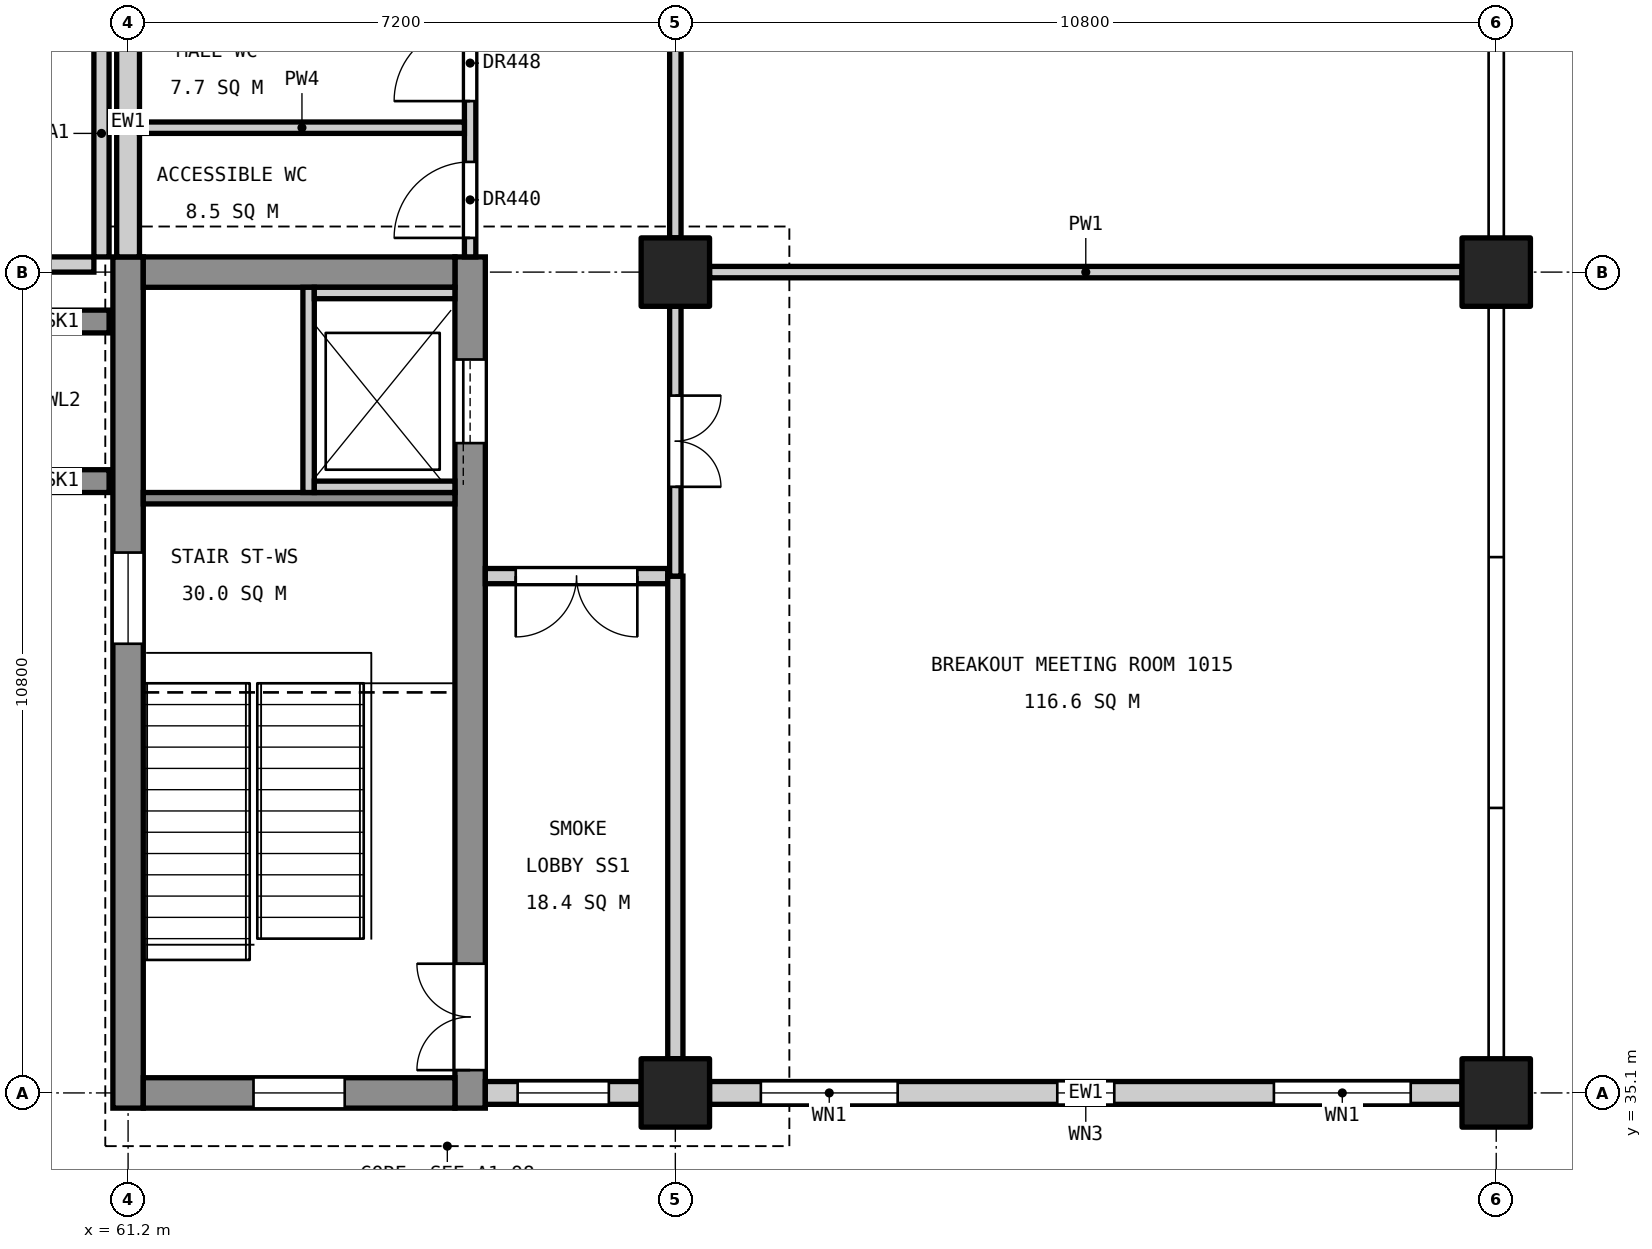
"""IFC4 building model, lengths in metres.
Left out: names, types, materials, properties, quantities, classifications, styles, units other than length and angle.
Written with IfcOpenShell. Run it as: python <this file> out.ifc"""

import sys

from ifc_helpers import new_model, si_unit, direction, frame, frame_2d, origin, origin_2d, place, context, subcontext, project, spatial, rectangle, extrude, element, fill, save


model = new_model("IFC4")
c1 = context("Model", 3, precision=1e-05, world=origin(), true_north=direction((0.0, 1.0)))
c2 = subcontext(c1, "Body", "Model", "MODEL_VIEW")
j1 = project(units=[si_unit("LENGTHUNIT", "METRE"), si_unit("PLANEANGLEUNIT", "RADIAN")], contexts=[c1])
p1 = place(None, origin())
s1 = spatial("IfcSite", under=j1, at=p1, CompositionType="ELEMENT")
p2 = place(p1, origin())
s2 = spatial("IfcBuilding", under=s1, at=p2, CompositionType="ELEMENT")
p3 = place(p2, frame((0.0, 0.0, 51.0)))
s3 = spatial("IfcBuildingStorey", under=s2, at=p3, CompositionType="ELEMENT", Elevation=51.0)
for number, where, z_axis, x_axis in (
    (1, (68.4, 35.1, 0.0), (0.0, 0.0, 1.0), (1.0, 0.0, 0.0)),
    (2, (68.4, 45.9, 0.0), (0.0, 0.0, 1.0), (1.0, 0.0, 0.0)),
    (3, (79.2, 35.1, 0.0), (0.0, 0.0, 1.0), (1.0, 0.0, 0.0)),
    (4, (79.2, 45.9, 0.0), (0.0, 0.0, 1.0), (1.0, 0.0, 0.0)),
):
    element("IfcColumn", number, at=place(p3, frame(where, z_axis=z_axis, x_axis=x_axis)), inside=s3, PredefinedType="COLUMN", context=c2, shape_type="SweptSolid", body=[
        extrude(rectangle(XDim=0.9, YDim=0.9, at=origin_2d()), origin(), (0.0, 0.0, 1.0), 4.8),
    ])
p4 = place(p3, frame((61.2, 34.9, 0.0), z_axis=(0.0, 0.0, 1.0), x_axis=(0.0, 1.0, 0.0)))
e5 = element("IfcWall", 5, at=p4, inside=s3, PredefinedType="SHEAR", context=c2, shape_type="SweptSolid", body=[
    extrude(rectangle(XDim=11.2, YDim=0.4, at=frame_2d((5.6, 0.0))), origin(), (0.0, 0.0, 1.0), 4.55),
])
p5 = place(p4, frame((6.11, 0.0, 3.4)))
e6 = element("IfcOpeningElement", 6, at=p5, cuts=e5, PredefinedType="OPENING", context=c2, shape_type="SweptSolid", body=[
    extrude(rectangle(XDim=1.2, YDim=0.9, at=frame_2d((0.6, 0.45))), frame((0.0, 0.21, 0.0), z_axis=(0.0, -1.0, 0.0), x_axis=(1.0, 0.0, 0.0)), (0.0, 0.0, 1.0), 0.42),
])
p6 = place(p3, frame((65.7, 34.9, 0.0), z_axis=(0.0, 0.0, 1.0), x_axis=(0.0, 1.0, 0.0)))
e7 = element("IfcWall", 7, at=p6, inside=s3, PredefinedType="SHEAR", context=c2, shape_type="SweptSolid", body=[
    extrude(rectangle(XDim=11.2, YDim=0.4, at=frame_2d((5.6, 0.0))), origin(), (0.0, 0.0, 1.0), 4.55),
])
p7 = place(p6, frame((0.5, 0.0, 0.0)))
e8 = element("IfcOpeningElement", 8, at=p7, cuts=e7, PredefinedType="OPENING", context=c2, shape_type="SweptSolid", body=[
    extrude(rectangle(XDim=1.4, YDim=2.1, at=frame_2d((0.7, 1.05))), frame((0.0, 0.21, 0.0), z_axis=(0.0, -1.0, 0.0), x_axis=(1.0, 0.0, 0.0)), (0.0, 0.0, 1.0), 0.42),
])
p8 = place(p6, frame((8.75, 0.0, 0.0)))
e9 = element("IfcOpeningElement", 9, at=p8, cuts=e7, PredefinedType="OPENING", context=c2, shape_type="SweptSolid", body=[
    extrude(rectangle(XDim=1.1, YDim=2.1, at=frame_2d((0.55, 1.05))), frame((0.0, 0.21, 0.0), z_axis=(0.0, -1.0, 0.0), x_axis=(1.0, 0.0, 0.0)), (0.0, 0.0, 1.0), 0.42),
])
p9 = place(p3, frame((61.4, 35.1, 0.0), z_axis=(0.0, 0.0, 1.0), x_axis=(1.0, 0.0, 0.0)))
e10 = element("IfcWall", 10, at=p9, inside=s3, PredefinedType="SHEAR", context=c2, shape_type="SweptSolid", body=[
    extrude(rectangle(XDim=4.1, YDim=0.4, at=frame_2d((2.05, 0.0))), origin(), (0.0, 0.0, 1.0), 4.55),
])
p10 = place(p9, frame((1.45, 0.0, 3.4)))
e11 = element("IfcOpeningElement", 11, at=p10, cuts=e10, PredefinedType="OPENING", context=c2, shape_type="SweptSolid", body=[
    extrude(rectangle(XDim=1.2, YDim=0.9, at=frame_2d((0.6, 0.45))), frame((0.0, 0.21, 0.0), z_axis=(0.0, -1.0, 0.0), x_axis=(1.0, 0.0, 0.0)), (0.0, 0.0, 1.0), 0.42),
])
p11 = place(p3, frame((61.4, 45.9, 0.0), z_axis=(0.0, 0.0, 1.0), x_axis=(1.0, 0.0, 0.0)))
e12 = element("IfcWall", 12, at=p11, inside=s3, PredefinedType="SHEAR", context=c2, shape_type="SweptSolid", body=[
    extrude(rectangle(XDim=4.1, YDim=0.4, at=frame_2d((2.05, 0.0))), origin(), (0.0, 0.0, 1.0), 4.55),
])
for number, where, z_axis, x_axis in (
    (13, (60.95, 43.15, 0.0), (0.0, 0.0, 1.0), (-1.0, 0.0, 0.0)),
    (14, (60.95, 45.25, 0.0), (0.0, 0.0, 1.0), (-1.0, 0.0, 0.0)),
):
    element("IfcWall", number, at=place(p3, frame(where, z_axis=z_axis, x_axis=x_axis)), inside=s3, PredefinedType="SHEAR", context=c2, shape_type="SweptSolid", body=[
        extrude(rectangle(XDim=1.25, YDim=0.3, at=frame_2d((0.625, 0.0))), origin(), (0.0, 0.0, 1.0), 4.8),
    ])
p12 = place(p3, frame((61.4, 42.925, 0.0), z_axis=(0.0, 0.0, 1.0), x_axis=(1.0, 0.0, 0.0)))
e15 = element("IfcWall", 15, at=p12, inside=s3, PredefinedType="SOLIDWALL", context=c2, shape_type="SweptSolid", body=[
    extrude(rectangle(XDim=4.1, YDim=0.15, at=frame_2d((2.05, 0.0))), origin(), (0.0, 0.0, 1.0), 4.55),
])
p13 = place(p3, frame((63.575, 43.0, 0.0), z_axis=(0.0, 0.0, 1.0), x_axis=(0.0, 1.0, 0.0)))
e16 = element("IfcWall", 16, at=p13, inside=s3, PredefinedType="SOLIDWALL", context=c2, shape_type="SweptSolid", body=[
    extrude(rectangle(XDim=2.7, YDim=0.15, at=frame_2d((1.35, 0.0))), origin(), (0.0, 0.0, 1.0), 4.8),
])
for number, where, z_axis, x_axis in (
    (17, (63.65, 43.075, 0.0), (0.0, 0.0, 1.0), (1.0, 0.0, 0.0)),
    (18, (63.65, 45.625, 0.0), (0.0, 0.0, 1.0), (1.0, 0.0, 0.0)),
):
    element("IfcWall", number, at=place(p3, frame(where, z_axis=z_axis, x_axis=x_axis)), inside=s3, PredefinedType="SOLIDWALL", context=c2, shape_type="SweptSolid", body=[
        extrude(rectangle(XDim=1.85, YDim=0.15, at=frame_2d((0.925, 0.0))), origin(), (0.0, 0.0, 1.0), 4.8),
    ])
p14 = place(p3, frame((60.85, 49.35, 0.0), z_axis=(0.0, 0.0, 1.0), x_axis=(0.0, -1.0, 0.0)))
e19 = element("IfcWall", 19, at=p14, inside=s3, PredefinedType="PARAPET", context=c2, shape_type="SweptSolid", body=[
    extrude(rectangle(XDim=3.25, YDim=0.2, at=frame_2d((1.625, 0.0))), origin(), (0.0, 0.0, 1.0), 1.2),
])
p15 = place(p3, frame((60.75, 46.0, 0.0), z_axis=(0.0, 0.0, 1.0), x_axis=(-1.0, 0.0, 0.0)))
e20 = element("IfcWall", 20, at=p15, inside=s3, PredefinedType="PARAPET", context=c2, shape_type="SweptSolid", body=[
    extrude(rectangle(XDim=3.15, YDim=0.2, at=frame_2d((1.575, 0.0))), origin(), (0.0, 0.0, 1.0), 1.2),
])
p16 = place(p3, frame((61.2, 46.1, 0.0), z_axis=(0.0, 0.0, 1.0), x_axis=(0.0, 1.0, 0.0)))
e21 = element("IfcWall", 21, at=p16, inside=s3, PredefinedType="STANDARD", context=c2, shape_type="SweptSolid", body=[
    extrude(rectangle(XDim=3.55, YDim=0.3, at=frame_2d((1.775, 0.0))), origin(), (0.0, 0.0, 1.0), 3.65),
])
p17 = place(p3, frame((65.9, 35.1, 0.0), z_axis=(0.0, 0.0, 1.0), x_axis=(1.0, 0.0, 0.0)))
e22 = element("IfcWall", 22, at=p17, inside=s3, PredefinedType="STANDARD", context=c2, shape_type="SweptSolid", body=[
    extrude(rectangle(XDim=2.05, YDim=0.3, at=frame_2d((1.025, 0.0))), origin(), (0.0, 0.0, 1.0), 3.85),
])
p18 = place(p17, frame((0.425, 0.0, 0.9)))
e23 = element("IfcOpeningElement", 23, at=p18, cuts=e22, PredefinedType="OPENING", context=c2, shape_type="SweptSolid", body=[
    extrude(rectangle(XDim=1.2, YDim=2.4, at=frame_2d((0.6, 1.2))), frame((0.0, 0.16, 0.0), z_axis=(0.0, -1.0, 0.0), x_axis=(1.0, 0.0, 0.0)), (0.0, 0.0, 1.0), 0.32),
])
p19 = place(p3, frame((68.85, 35.1, 0.0), z_axis=(0.0, 0.0, 1.0), x_axis=(1.0, 0.0, 0.0)))
e24 = element("IfcWall", 24, at=p19, inside=s3, PredefinedType="STANDARD", context=c2, shape_type="SweptSolid", body=[
    extrude(rectangle(XDim=9.9, YDim=0.3, at=frame_2d((4.95, 0.0))), origin(), (0.0, 0.0, 1.0), 3.85),
])
p20 = place(p19, frame((0.675, 0.0, 0.9)))
e25 = element("IfcOpeningElement", 25, at=p20, cuts=e24, PredefinedType="OPENING", context=c2, shape_type="SweptSolid", body=[
    extrude(rectangle(XDim=1.8, YDim=2.4, at=frame_2d((0.9, 1.2))), frame((0.0, 0.16, 0.0), z_axis=(0.0, -1.0, 0.0), x_axis=(1.0, 0.0, 0.0)), (0.0, 0.0, 1.0), 0.32),
])
p21 = place(p19, frame((4.575, 0.0, 0.8)))
e26 = element("IfcOpeningElement", 26, at=p21, cuts=e24, PredefinedType="OPENING", context=c2, shape_type="SweptSolid", body=[
    extrude(rectangle(XDim=0.75, YDim=1.2, at=frame_2d((0.375, 0.6))), frame((0.0, 0.16, 0.0), z_axis=(0.0, -1.0, 0.0), x_axis=(1.0, 0.0, 0.0)), (0.0, 0.0, 1.0), 0.32),
])
p22 = place(p19, frame((7.425, 0.0, 0.9)))
e27 = element("IfcOpeningElement", 27, at=p22, cuts=e24, PredefinedType="OPENING", context=c2, shape_type="SweptSolid", body=[
    extrude(rectangle(XDim=1.8, YDim=2.4, at=frame_2d((0.9, 1.2))), frame((0.0, 0.16, 0.0), z_axis=(0.0, -1.0, 0.0), x_axis=(1.0, 0.0, 0.0)), (0.0, 0.0, 1.0), 0.32),
])
p23 = place(p3, frame((65.7, 46.1, 0.0), z_axis=(0.0, 0.0, 1.0), x_axis=(0.0, 1.0, 0.0)))
e28 = element("IfcWall", 28, at=p23, inside=s3, PredefinedType="PARTITIONING", context=c2, shape_type="SweptSolid", body=[
    extrude(rectangle(XDim=10.45, YDim=0.15, at=frame_2d((5.225, 0.0))), origin(), (0.0, 0.0, 1.0), 3.55),
])
p24 = place(p23, frame((0.25, 0.0, 0.0)))
e29 = element("IfcOpeningElement", 29, at=p24, cuts=e28, PredefinedType="OPENING", context=c2, shape_type="SweptSolid", body=[
    extrude(rectangle(XDim=1.0, YDim=2.1, at=frame_2d((0.5, 1.05))), frame((0.0, 0.085, 0.0), z_axis=(0.0, -1.0, 0.0), x_axis=(1.0, 0.0, 0.0)), (0.0, 0.0, 1.0), 0.17),
])
p25 = place(p23, frame((2.05, 0.0, 0.0)))
e30 = element("IfcOpeningElement", 30, at=p25, cuts=e28, PredefinedType="OPENING", context=c2, shape_type="SweptSolid", body=[
    extrude(rectangle(XDim=1.0, YDim=2.1, at=frame_2d((0.5, 1.05))), frame((0.0, 0.085, 0.0), z_axis=(0.0, -1.0, 0.0), x_axis=(1.0, 0.0, 0.0)), (0.0, 0.0, 1.0), 0.17),
])
p26 = place(p23, frame((6.5, 0.0, 0.0)))
e31 = element("IfcOpeningElement", 31, at=p26, cuts=e28, PredefinedType="OPENING", context=c2, shape_type="SweptSolid", body=[
    extrude(rectangle(XDim=1.0, YDim=2.1, at=frame_2d((0.5, 1.05))), frame((0.0, 0.085, 0.0), z_axis=(0.0, -1.0, 0.0), x_axis=(1.0, 0.0, 0.0)), (0.0, 0.0, 1.0), 0.17),
])
p27 = place(p3, frame((61.35, 47.8, 0.0), z_axis=(0.0, 0.0, 1.0), x_axis=(1.0, 0.0, 0.0)))
e32 = element("IfcWall", 32, at=p27, inside=s3, PredefinedType="PARTITIONING", context=c2, shape_type="SweptSolid", body=[
    extrude(rectangle(XDim=4.275, YDim=0.15, at=frame_2d((2.137, 0.0))), origin(), (0.0, 0.0, 1.0), 3.55),
])
p28 = place(p3, frame((65.9, 41.9, 0.0), z_axis=(0.0, 0.0, 1.0), x_axis=(1.0, 0.0, 0.0)))
e33 = element("IfcWall", 33, at=p28, inside=s3, PredefinedType="PARTITIONING", context=c2, shape_type="SweptSolid", body=[
    extrude(rectangle(XDim=2.4, YDim=0.2, at=frame_2d((1.2, 0.0))), origin(), (0.0, 0.0, 1.0), 3.55),
])
p29 = place(p28, frame((0.4, 0.0, 0.0)))
e34 = element("IfcOpeningElement", 34, at=p29, cuts=e33, PredefinedType="OPENING", context=c2, shape_type="SweptSolid", body=[
    extrude(rectangle(XDim=1.6, YDim=2.1, at=frame_2d((0.8, 1.05))), frame((0.0, 0.11, 0.0), z_axis=(0.0, -1.0, 0.0), x_axis=(1.0, 0.0, 0.0)), (0.0, 0.0, 1.0), 0.22),
])
p30 = place(p3, frame((68.4, 35.55, 0.0), z_axis=(0.0, 0.0, 1.0), x_axis=(0.0, 1.0, 0.0)))
e35 = element("IfcWall", 35, at=p30, inside=s3, PredefinedType="PARTITIONING", context=c2, shape_type="SweptSolid", body=[
    extrude(rectangle(XDim=6.35, YDim=0.2, at=frame_2d((3.175, 0.0))), origin(), (0.0, 0.0, 1.0), 3.55),
])
p31 = place(p3, frame((68.4, 41.9, 0.0), z_axis=(0.0, 0.0, 1.0), x_axis=(0.0, 1.0, 0.0)))
e36 = element("IfcWall", 36, at=p31, inside=s3, PredefinedType="PARTITIONING", context=c2, shape_type="SweptSolid", body=[
    extrude(rectangle(XDim=3.55, YDim=0.15, at=frame_2d((1.775, 0.0))), origin(), (0.0, 0.0, 1.0), 3.55),
])
p32 = place(p31, frame((1.175, 0.0, 0.0)))
e37 = element("IfcOpeningElement", 37, at=p32, cuts=e36, PredefinedType="OPENING", context=c2, shape_type="SweptSolid", body=[
    extrude(rectangle(XDim=1.2, YDim=2.1, at=frame_2d((0.6, 1.05))), frame((0.0, 0.085, 0.0), z_axis=(0.0, -1.0, 0.0), x_axis=(1.0, 0.0, 0.0)), (0.0, 0.0, 1.0), 0.17),
])
p33 = place(p3, frame((68.4, 46.35, 0.0), z_axis=(0.0, 0.0, 1.0), x_axis=(0.0, 1.0, 0.0)))
e38 = element("IfcWall", 38, at=p33, inside=s3, PredefinedType="PARTITIONING", context=c2, shape_type="SweptSolid", body=[
    extrude(rectangle(XDim=9.9, YDim=0.15, at=frame_2d((4.95, 0.0))), origin(), (0.0, 0.0, 1.0), 3.55),
])
p34 = place(p33, frame((7.725, 0.0, 0.0)))
e39 = element("IfcOpeningElement", 39, at=p34, cuts=e38, PredefinedType="OPENING", context=c2, shape_type="SweptSolid", body=[
    extrude(rectangle(XDim=1.2, YDim=2.1, at=frame_2d((0.6, 1.05))), frame((0.0, 0.085, 0.0), z_axis=(0.0, -1.0, 0.0), x_axis=(1.0, 0.0, 0.0)), (0.0, 0.0, 1.0), 0.17),
])
p35 = place(p33, frame((2.775, 0.0, 0.0)))
e40 = element("IfcOpeningElement", 40, at=p35, cuts=e38, PredefinedType="OPENING", context=c2, shape_type="SweptSolid", body=[
    extrude(rectangle(XDim=1.2, YDim=2.1, at=frame_2d((0.6, 1.05))), frame((0.0, 0.085, 0.0), z_axis=(0.0, -1.0, 0.0), x_axis=(1.0, 0.0, 0.0)), (0.0, 0.0, 1.0), 0.17),
])
p36 = place(p3, frame((68.85, 45.9, 0.0), z_axis=(0.0, 0.0, 1.0), x_axis=(1.0, 0.0, 0.0)))
e41 = element("IfcWall", 41, at=p36, inside=s3, PredefinedType="PARTITIONING", context=c2, shape_type="SweptSolid", body=[
    extrude(rectangle(XDim=9.9, YDim=0.15, at=frame_2d((4.95, 0.0))), origin(), (0.0, 0.0, 1.0), 3.85),
])
p37 = place(p7, origin())
e42 = element("IfcDoor", 42, at=p37, inside=s3, OperationType="DOUBLE_DOOR_SINGLE_SWING", PredefinedType="DOOR", context=c2, shape_type="SweptSolid", body=[
    extrude(rectangle(XDim=1.4, YDim=2.1, at=frame_2d((0.7, 1.05))), frame((0.0, 0.025, 0.0), z_axis=(0.0, -1.0, 0.0), x_axis=(1.0, 0.0, 0.0)), (0.0, 0.0, 1.0), 0.05),
])
fill(e8, e42)
p38 = place(p8, origin())
e43 = element("IfcDoor", 43, at=p38, inside=s3, OperationType="SLIDING_TO_LEFT", PredefinedType="DOOR", context=c2, shape_type="SweptSolid", body=[
    extrude(rectangle(XDim=1.1, YDim=2.1, at=frame_2d((0.55, 1.05))), frame((0.0, 0.025, 0.0), z_axis=(0.0, -1.0, 0.0), x_axis=(1.0, 0.0, 0.0)), (0.0, 0.0, 1.0), 0.05),
])
fill(e9, e43)
p39 = place(p18, origin())
e44 = element("IfcWindow", 44, at=p39, inside=s3, PartitioningType="SINGLE_PANEL", PredefinedType="WINDOW", context=c2, shape_type="SweptSolid", body=[
    extrude(rectangle(XDim=1.2, YDim=2.4, at=frame_2d((0.6, 1.2))), frame((0.0, 0.03, 0.0), z_axis=(0.0, -1.0, 0.0), x_axis=(1.0, 0.0, 0.0)), (0.0, 0.0, 1.0), 0.06),
])
fill(e23, e44)
p40 = place(p20, origin())
e45 = element("IfcWindow", 45, at=p40, inside=s3, PartitioningType="SINGLE_PANEL", PredefinedType="WINDOW", context=c2, shape_type="SweptSolid", body=[
    extrude(rectangle(XDim=1.8, YDim=2.4, at=frame_2d((0.9, 1.2))), frame((0.0, 0.03, 0.0), z_axis=(0.0, -1.0, 0.0), x_axis=(1.0, 0.0, 0.0)), (0.0, 0.0, 1.0), 0.06),
])
fill(e25, e45)
p41 = place(p21, origin())
e46 = element("IfcWindow", 46, at=p41, inside=s3, PartitioningType="SINGLE_PANEL", PredefinedType="WINDOW", context=c2, shape_type="SweptSolid", body=[
    extrude(rectangle(XDim=0.75, YDim=1.2, at=frame_2d((0.375, 0.6))), frame((0.0, 0.03, 0.0), z_axis=(0.0, -1.0, 0.0), x_axis=(1.0, 0.0, 0.0)), (0.0, 0.0, 1.0), 0.06),
])
fill(e26, e46)
p42 = place(p22, origin())
e47 = element("IfcWindow", 47, at=p42, inside=s3, PartitioningType="SINGLE_PANEL", PredefinedType="WINDOW", context=c2, shape_type="SweptSolid", body=[
    extrude(rectangle(XDim=1.8, YDim=2.4, at=frame_2d((0.9, 1.2))), frame((0.0, 0.03, 0.0), z_axis=(0.0, -1.0, 0.0), x_axis=(1.0, 0.0, 0.0)), (0.0, 0.0, 1.0), 0.06),
])
fill(e27, e47)
p43 = place(p5, origin())
e48 = element("IfcWindow", 48, at=p43, inside=s3, PartitioningType="SINGLE_PANEL", PredefinedType="WINDOW", context=c2, shape_type="SweptSolid", body=[
    extrude(rectangle(XDim=1.2, YDim=0.9, at=frame_2d((0.6, 0.45))), frame((0.0, 0.03, 0.0), z_axis=(0.0, -1.0, 0.0), x_axis=(1.0, 0.0, 0.0)), (0.0, 0.0, 1.0), 0.06),
])
fill(e6, e48)
p44 = place(p10, origin())
e49 = element("IfcWindow", 49, at=p44, inside=s3, PartitioningType="SINGLE_PANEL", PredefinedType="WINDOW", context=c2, shape_type="SweptSolid", body=[
    extrude(rectangle(XDim=1.2, YDim=0.9, at=frame_2d((0.6, 0.45))), frame((0.0, 0.03, 0.0), z_axis=(0.0, -1.0, 0.0), x_axis=(1.0, 0.0, 0.0)), (0.0, 0.0, 1.0), 0.06),
])
fill(e11, e49)
p45 = place(p24, origin())
e50 = element("IfcDoor", 50, at=p45, inside=s3, OperationType="SINGLE_SWING_LEFT", PredefinedType="DOOR", context=c2, shape_type="SweptSolid", body=[
    extrude(rectangle(XDim=1.0, YDim=2.1, at=frame_2d((0.5, 1.05))), frame((0.0, 0.025, 0.0), z_axis=(0.0, -1.0, 0.0), x_axis=(1.0, 0.0, 0.0)), (0.0, 0.0, 1.0), 0.05),
])
fill(e29, e50)
p46 = place(p32, frame((1.2, 0.0, 0.0), z_axis=(0.0, 0.0, 1.0), x_axis=(-1.0, 0.0, 0.0)))
e51 = element("IfcDoor", 51, at=p46, inside=s3, OperationType="DOUBLE_DOOR_SINGLE_SWING", PredefinedType="DOOR", context=c2, shape_type="SweptSolid", body=[
    extrude(rectangle(XDim=1.2, YDim=2.1, at=frame_2d((0.6, 1.05))), frame((0.0, 0.025, 0.0), z_axis=(0.0, -1.0, 0.0), x_axis=(1.0, 0.0, 0.0)), (0.0, 0.0, 1.0), 0.05),
])
fill(e37, e51)
p47 = place(p25, origin())
e52 = element("IfcDoor", 52, at=p47, inside=s3, OperationType="SINGLE_SWING_LEFT", PredefinedType="DOOR", context=c2, shape_type="SweptSolid", body=[
    extrude(rectangle(XDim=1.0, YDim=2.1, at=frame_2d((0.5, 1.05))), frame((0.0, 0.025, 0.0), z_axis=(0.0, -1.0, 0.0), x_axis=(1.0, 0.0, 0.0)), (0.0, 0.0, 1.0), 0.05),
])
fill(e30, e52)
p48 = place(p29, frame((1.6, 0.0, 0.0), z_axis=(0.0, 0.0, 1.0), x_axis=(-1.0, 0.0, 0.0)))
e53 = element("IfcDoor", 53, at=p48, inside=s3, OperationType="DOUBLE_DOOR_SINGLE_SWING", PredefinedType="DOOR", context=c2, shape_type="SweptSolid", body=[
    extrude(rectangle(XDim=1.6, YDim=2.1, at=frame_2d((0.8, 1.05))), frame((0.0, 0.025, 0.0), z_axis=(0.0, -1.0, 0.0), x_axis=(1.0, 0.0, 0.0)), (0.0, 0.0, 1.0), 0.05),
])
fill(e34, e53)
save(model, sys.argv[1])
